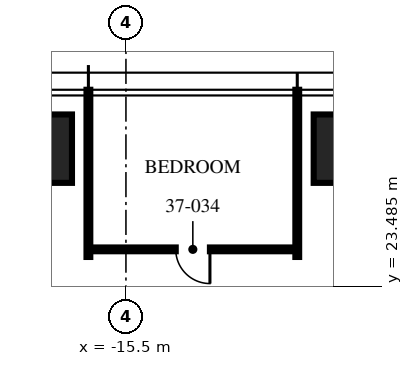
"""IFC4 building model, lengths in metres.
Left out: names, types, materials, properties, quantities, classifications, styles, units other than length and angle.
Written with IfcOpenShell. Run it as: python <this file> out.ifc"""

import sys

from ifc_helpers import new_model, si_unit, direction, frame, frame_2d, origin, origin_2d, place, context, subcontext, project, spatial, rectangle, extrude, element, fill, save


model = new_model("IFC4")
c1 = context("Model", 3, precision=1e-05, world=origin(), true_north=direction((0.0, 1.0)))
c2 = subcontext(c1, "Body", "Model", "MODEL_VIEW")
j1 = project(units=[si_unit("LENGTHUNIT", "METRE"), si_unit("PLANEANGLEUNIT", "RADIAN")], contexts=[c1])
p1 = place(None, origin())
s1 = spatial("IfcSite", under=j1, at=p1, CompositionType="ELEMENT")
p2 = place(p1, origin())
s2 = spatial("IfcBuilding", under=s1, at=p2, CompositionType="ELEMENT")
p3 = place(p2, frame((0.0, 0.0, 148.5)))
s3 = spatial("IfcBuildingStorey", under=s2, at=p3, CompositionType="ELEMENT", Elevation=148.5)
for number, where, z_axis, x_axis in (
    (1, (-18.32, 27.1, 0.0), (0.0, 0.0, 1.0), (1.0, 0.0, 0.0)),
    (2, (-9.16, 27.1, 0.0), (0.0, 0.0, 1.0), (1.0, 0.0, 0.0)),
):
    element("IfcColumn", number, at=place(p3, frame(where, z_axis=z_axis, x_axis=x_axis)), inside=s3, PredefinedType="COLUMN", context=c2, shape_type="SweptSolid", body=[
        extrude(rectangle(XDim=2.8, YDim=1.8, at=origin_2d()), origin(), (0.0, 0.0, 1.0), 3.75),
    ])
for number, where, z_axis, x_axis in (
    (3, (-10.992, 24.25, 0.0), (0.0, 0.0, 1.0), (0.0, 1.0, 0.0)),
    (4, (-16.488, 24.25, 0.0), (0.0, 0.0, 1.0), (0.0, 1.0, 0.0)),
):
    element("IfcWall", number, at=place(p3, frame(where, z_axis=z_axis, x_axis=x_axis)), inside=s3, PredefinedType="PARTITIONING", context=c2, shape_type="SweptSolid", body=[
        extrude(rectangle(XDim=4.4, YDim=0.1, at=frame_2d((2.2, 0.0))), origin(), (0.0, 0.0, 1.0), 2.81),
    ])
p4 = place(p3, frame((-10.992, 24.45, 0.0), z_axis=(0.0, 0.0, 1.0), x_axis=(-1.0, 0.0, 0.0)))
e5 = element("IfcWall", 5, at=p4, inside=s3, PredefinedType="PARTITIONING", context=c2, shape_type="SweptSolid", body=[
    extrude(rectangle(XDim=5.496, YDim=0.1, at=frame_2d((2.748, 0.0))), origin(), (0.0, 0.0, 1.0), 2.81),
])
p5 = place(p4, frame((2.298, 0.0, 0.0)))
e6 = element("IfcOpeningElement", 6, at=p5, cuts=e5, PredefinedType="OPENING", context=c2, shape_type="SweptSolid", body=[
    extrude(rectangle(XDim=0.9, YDim=2.1, at=frame_2d((0.45, 1.05))), frame((0.0, 0.06, 0.0), z_axis=(0.0, -1.0, 0.0), x_axis=(1.0, 0.0, 0.0)), (0.0, 0.0, 1.0), 0.12),
])
p6 = place(p5, origin())
e7 = element("IfcDoor", 7, at=p6, inside=s3, OperationType="SINGLE_SWING_LEFT", PredefinedType="DOOR", context=c2, shape_type="SweptSolid", body=[
    extrude(rectangle(XDim=0.9, YDim=2.1, at=frame_2d((0.45, 1.05))), frame((0.0, 0.025, 0.0), z_axis=(0.0, -1.0, 0.0), x_axis=(1.0, 0.0, 0.0)), (0.0, 0.0, 1.0), 0.05),
])
fill(e6, e7)
save(model, sys.argv[1])
